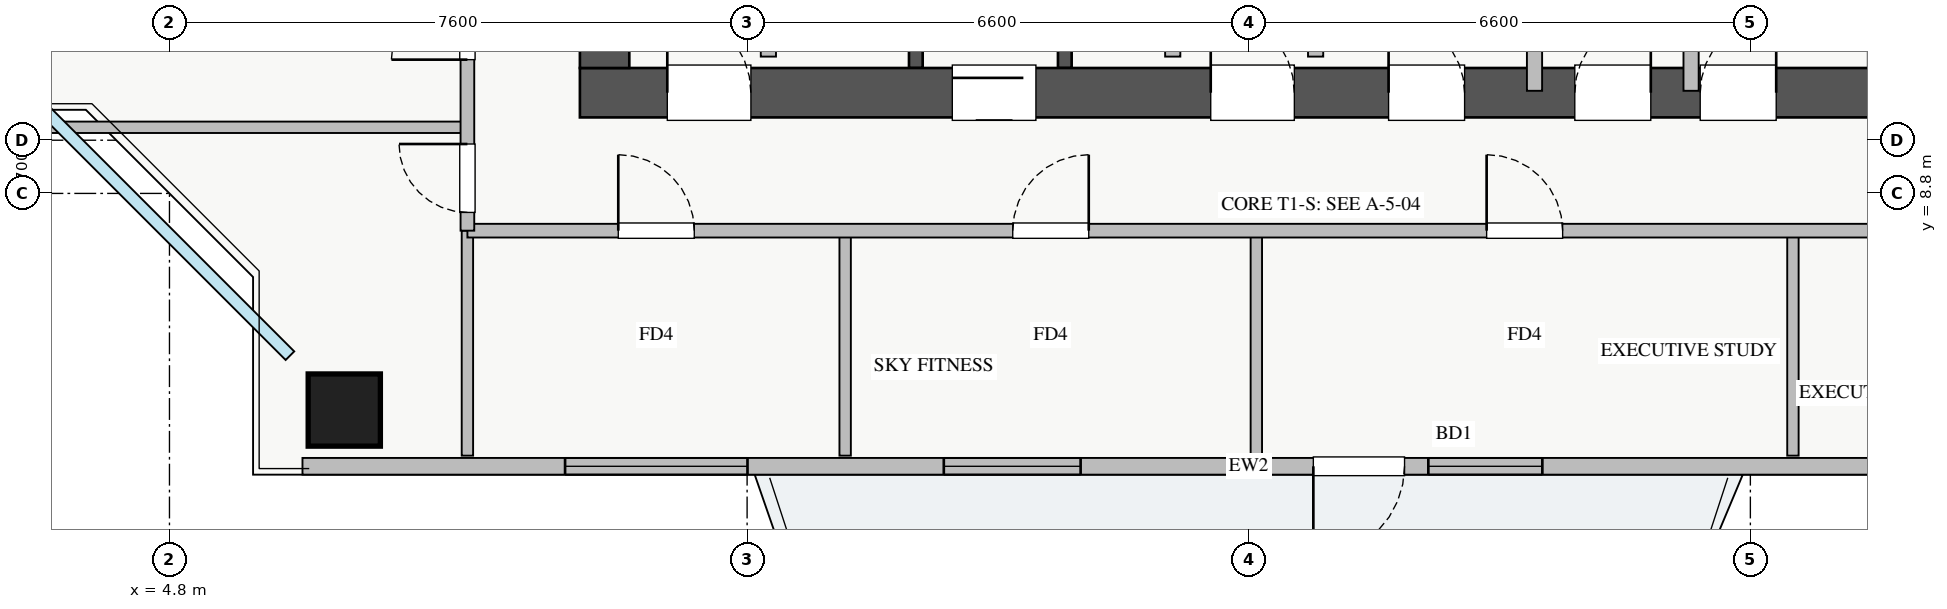
"""IFC4 building model, lengths in metres.
Left out: names, types, materials, properties, quantities, classifications, styles, units other than length and angle.
Written with IfcOpenShell. Run it as: python <this file> out.ifc"""

import sys

from ifc_helpers import new_model, si_unit, direction, frame, frame_2d, origin, origin_2d, place, context, subcontext, project, spatial, rectangle, extrude, source, transform, mapped, element, fill, save


model = new_model("IFC4")
c1 = context("Model", 3, precision=1e-05, world=origin(), true_north=direction((0.0, 1.0)))
c2 = subcontext(c1, "Body", "Model", "MODEL_VIEW")
j1 = project(units=[si_unit("LENGTHUNIT", "METRE"), si_unit("PLANEANGLEUNIT", "RADIAN")], contexts=[c1])
p1 = place(None, origin())
s1 = spatial("IfcSite", under=j1, at=p1, CompositionType="ELEMENT")
p2 = place(p1, origin())
s2 = spatial("IfcBuilding", under=s1, at=p2, CompositionType="ELEMENT")
p3 = place(p2, frame((0.0, 0.0, 179.5)))
s3 = spatial("IfcBuildingStorey", under=s2, at=p3, CompositionType="ELEMENT", Elevation=179.5)
for number, where, z_axis, x_axis in (
    (1, (14.62, 10.45, 0.0), (0.0, 0.0, 1.0), (0.0, 1.0, 0.0)),
    (2, (16.58, 10.45, 0.0), (0.0, 0.0, 1.0), (0.0, 1.0, 0.0)),
):
    element("IfcWall", number, at=place(p3, frame(where, z_axis=z_axis, x_axis=x_axis)), inside=s3, PredefinedType="SHEAR", context=c2, shape_type="SweptSolid", body=[
        extrude(rectangle(XDim=2.35, YDim=0.18, at=frame_2d((1.175, 0.0))), origin(), (0.0, 0.0, 1.0), 3.07),
    ])
p4 = place(p3, frame((10.2, 10.125, 0.0), z_axis=(0.0, 0.0, 1.0), x_axis=(1.0, 0.0, 0.0)))
e3 = element("IfcWall", 3, at=p4, inside=s3, PredefinedType="SHEAR", context=c2, shape_type="SweptSolid", body=[
    extrude(rectangle(XDim=17.6, YDim=0.65, at=frame_2d((8.8, 0.0))), origin(), (0.0, 0.0, 1.0), 3.25),
])
p5 = place(p4, frame((1.15, 0.0, 0.0)))
e4 = element("IfcOpeningElement", 4, at=p5, cuts=e3, PredefinedType="OPENING", context=c2, shape_type="SweptSolid", body=[
    extrude(rectangle(XDim=1.1, YDim=2.05, at=frame_2d((0.55, 1.025))), frame((0.0, 0.335, 0.0), z_axis=(0.0, -1.0, 0.0), x_axis=(1.0, 0.0, 0.0)), (0.0, 0.0, 1.0), 0.67),
])
p6 = place(p4, frame((8.3, 0.0, 0.0)))
e5 = element("IfcOpeningElement", 5, at=p6, cuts=e3, PredefinedType="OPENING", context=c2, shape_type="SweptSolid", body=[
    extrude(rectangle(XDim=1.1, YDim=2.05, at=frame_2d((0.55, 1.025))), frame((0.0, 0.335, 0.0), z_axis=(0.0, -1.0, 0.0), x_axis=(1.0, 0.0, 0.0)), (0.0, 0.0, 1.0), 0.67),
])
p7 = place(p4, frame((4.9, 0.0, 0.0)))
e6 = element("IfcOpeningElement", 6, at=p7, cuts=e3, PredefinedType="OPENING", context=c2, shape_type="SweptSolid", body=[
    extrude(rectangle(XDim=1.1, YDim=2.05, at=frame_2d((0.55, 1.025))), frame((0.0, 0.335, 0.0), z_axis=(0.0, -1.0, 0.0), x_axis=(1.0, 0.0, 0.0)), (0.0, 0.0, 1.0), 0.67),
])
p8 = place(p4, frame((14.74, 0.0, 0.0)))
e7 = element("IfcOpeningElement", 7, at=p8, cuts=e3, PredefinedType="OPENING", context=c2, shape_type="SweptSolid", body=[
    extrude(rectangle(XDim=1.0, YDim=2.05, at=frame_2d((0.5, 1.025))), frame((0.0, 0.335, 0.0), z_axis=(0.0, -1.0, 0.0), x_axis=(1.0, 0.0, 0.0)), (0.0, 0.0, 1.0), 0.67),
])
p9 = place(p4, frame((10.64, 0.0, 0.0)))
e8 = element("IfcOpeningElement", 8, at=p9, cuts=e3, PredefinedType="OPENING", context=c2, shape_type="SweptSolid", body=[
    extrude(rectangle(XDim=1.0, YDim=2.05, at=frame_2d((0.5, 1.025))), frame((0.0, 0.335, 0.0), z_axis=(0.0, -1.0, 0.0), x_axis=(1.0, 0.0, 0.0)), (0.0, 0.0, 1.0), 0.67),
])
p10 = place(p4, frame((13.09, 0.0, 0.0)))
e9 = element("IfcOpeningElement", 9, at=p10, cuts=e3, PredefinedType="OPENING", context=c2, shape_type="SweptSolid", body=[
    extrude(rectangle(XDim=1.0, YDim=2.05, at=frame_2d((0.5, 1.025))), frame((0.0, 0.335, 0.0), z_axis=(0.0, -1.0, 0.0), x_axis=(1.0, 0.0, 0.0)), (0.0, 0.0, 1.0), 0.67),
])
p11 = place(p3, frame((10.525, 10.45, 0.0), z_axis=(0.0, 0.0, 1.0), x_axis=(0.0, 1.0, 0.0)))
e10 = element("IfcWall", 10, at=p11, inside=s3, PredefinedType="SHEAR", context=c2, shape_type="SweptSolid", body=[
    extrude(rectangle(XDim=5.9, YDim=0.65, at=frame_2d((2.95, 0.0))), origin(), (0.0, 0.0, 1.0), 3.25),
])
m1 = source(origin(), c2, "Body", "SweptSolid", [
    extrude(rectangle(XDim=0.95, YDim=0.95, at=origin_2d()), origin(), (0.0, 0.0, 1.0), 3.25),
])
p12 = place(p3, frame((7.1, 5.95, 0.0), z_axis=(0.0, 0.0, 1.0), x_axis=(1.0, 0.0, 0.0)))
e11 = element("IfcColumn", 11, at=p12, inside=s3, PredefinedType="COLUMN", context=c2, shape_type="MappedRepresentation", body=[
    mapped(m1, transform((0.0, 0.0, 0.0), x_axis=(1.0, 0.0, 0.0), y_axis=(0.0, 1.0, 0.0), z_axis=(0.0, 0.0, 1.0), scale=1.0)),
])
p13 = place(p3, frame((6.55, 5.21, 0.0), z_axis=(0.0, 0.0, 1.0), x_axis=(1.0, 0.0, 0.0)))
e12 = element("IfcWall", 12, at=p13, inside=s3, PredefinedType="STANDARD", context=c2, shape_type="SweptSolid", body=[
    extrude(rectangle(XDim=24.9, YDim=0.22, at=frame_2d((12.45, 0.0))), origin(), (0.0, 0.0, 1.0), 2.61),
])
p14 = place(p13, frame((13.3, 0.0, 0.0)))
e13 = element("IfcOpeningElement", 13, at=p14, cuts=e12, PredefinedType="OPENING", context=c2, shape_type="SweptSolid", body=[
    extrude(rectangle(XDim=1.2, YDim=2.1, at=frame_2d((0.6, 1.05))), frame((0.0, 0.12, 0.0), z_axis=(0.0, -1.0, 0.0), x_axis=(1.0, 0.0, 0.0)), (0.0, 0.0, 1.0), 0.24),
])
p15 = place(p13, frame((3.455, 0.0, 0.9)))
e14 = element("IfcOpeningElement", 14, at=p15, cuts=e12, PredefinedType="OPENING", context=c2, shape_type="SweptSolid", body=[
    extrude(rectangle(XDim=2.4, YDim=1.5, at=frame_2d((1.2, 0.75))), frame((0.0, 0.12, 0.0), z_axis=(0.0, -1.0, 0.0), x_axis=(1.0, 0.0, 0.0)), (0.0, 0.0, 1.0), 0.24),
])
p16 = place(p13, frame((8.438, 0.0, 0.9)))
e15 = element("IfcOpeningElement", 15, at=p16, cuts=e12, PredefinedType="OPENING", context=c2, shape_type="SweptSolid", body=[
    extrude(rectangle(XDim=1.8, YDim=1.45, at=frame_2d((0.9, 0.725))), frame((0.0, 0.12, 0.0), z_axis=(0.0, -1.0, 0.0), x_axis=(1.0, 0.0, 0.0)), (0.0, 0.0, 1.0), 0.24),
])
p17 = place(p13, frame((14.813, 0.0, 0.9)))
e16 = element("IfcOpeningElement", 16, at=p17, cuts=e12, PredefinedType="OPENING", context=c2, shape_type="SweptSolid", body=[
    extrude(rectangle(XDim=1.5, YDim=1.45, at=frame_2d((0.75, 0.725))), frame((0.0, 0.12, 0.0), z_axis=(0.0, -1.0, 0.0), x_axis=(1.0, 0.0, 0.0)), (0.0, 0.0, 1.0), 0.24),
])
p18 = place(p13, frame((20.738, 0.0, 0.9)))
e17 = element("IfcOpeningElement", 17, at=p18, cuts=e12, PredefinedType="OPENING", context=c2, shape_type="SweptSolid", body=[
    extrude(rectangle(XDim=2.1, YDim=1.48, at=frame_2d((1.05, 0.74))), frame((0.0, 0.12, 0.0), z_axis=(0.0, -1.0, 0.0), x_axis=(1.0, 0.0, 0.0)), (0.0, 0.0, 1.0), 0.24),
])
for number, where, z_axis, x_axis in (
    (18, (12.68, 10.6, 0.0), (0.0, 0.0, 1.0), (0.0, 1.0, 0.0)),
    (19, (18.0, 10.6, 0.0), (0.0, 0.0, 1.0), (0.0, 1.0, 0.0)),
    (20, (19.88, 10.6, 0.0), (0.0, 0.0, 1.0), (0.0, 1.0, 0.0)),
):
    element("IfcWall", number, at=place(p3, frame(where, z_axis=z_axis, x_axis=x_axis)), inside=s3, PredefinedType="PARTITIONING", context=c2, shape_type="SweptSolid", body=[
        extrude(rectangle(XDim=2.21, YDim=0.2, at=frame_2d((1.105, 0.0))), origin(), (0.0, 0.0, 1.0), 3.07),
    ])
for number, where, z_axis, x_axis in (
    (21, (24.82, 10.15, 0.0), (0.0, 0.0, 1.0), (0.0, 1.0, 0.0)),
    (22, (22.76, 10.15, 0.0), (0.0, 0.0, 1.0), (0.0, 1.0, 0.0)),
):
    element("IfcWall", number, at=place(p3, frame(where, z_axis=z_axis, x_axis=x_axis)), inside=s3, PredefinedType="PARTITIONING", context=c2, shape_type="SweptSolid", body=[
        extrude(rectangle(XDim=2.65, YDim=0.2, at=frame_2d((1.325, 0.0))), origin(), (0.0, 0.0, 1.0), 3.07),
    ])
p19 = place(p3, frame((13.69, 5.35, 0.0), z_axis=(0.0, 0.0, 1.0), x_axis=(0.0, 1.0, 0.0)))
e23 = element("IfcWall", 23, at=p19, inside=s3, PredefinedType="PARTITIONING", context=c2, shape_type="SweptSolid", body=[
    extrude(rectangle(XDim=2.96, YDim=0.15, at=frame_2d((1.48, 0.0))), origin(), (0.0, 0.0, 1.0), 3.07),
])
p20 = place(p3, frame((19.1, 5.35, 0.0), z_axis=(0.0, 0.0, 1.0), x_axis=(0.0, 1.0, 0.0)))
e24 = element("IfcWall", 24, at=p20, inside=s3, PredefinedType="PARTITIONING", context=c2, shape_type="SweptSolid", body=[
    extrude(rectangle(XDim=2.96, YDim=0.15, at=frame_2d((1.48, 0.0))), origin(), (0.0, 0.0, 1.0), 2.821),
])
for number, where, z_axis, x_axis in (
    (25, (26.16, 5.35, 0.0), (0.0, 0.0, 1.0), (0.0, 1.0, 0.0)),
    (26, (8.72, 5.35, 0.0), (0.0, 0.0, 1.0), (0.0, 1.0, 0.0)),
):
    element("IfcWall", number, at=place(p3, frame(where, z_axis=z_axis, x_axis=x_axis)), inside=s3, PredefinedType="PARTITIONING", context=c2, shape_type="SweptSolid", body=[
        extrude(rectangle(XDim=2.96, YDim=0.15, at=frame_2d((1.48, 0.0))), origin(), (0.0, 0.0, 1.0), 3.07),
    ])
p21 = place(p3, frame((8.72, 8.31, 0.0), z_axis=(0.0, 0.0, 1.0), x_axis=(1.0, 0.0, 0.0)))
e27 = element("IfcWall", 27, at=p21, inside=s3, PredefinedType="PARTITIONING", context=c2, shape_type="SweptSolid", body=[
    extrude(rectangle(XDim=23.63, YDim=0.18, at=frame_2d((11.815, 0.0))), origin(), (0.0, 0.0, 1.0), 3.07),
])
p22 = place(p21, frame((1.985, 0.0, 0.0)))
e28 = element("IfcOpeningElement", 28, at=p22, cuts=e27, PredefinedType="OPENING", context=c2, shape_type="SweptSolid", body=[
    extrude(rectangle(XDim=1.0, YDim=2.05, at=frame_2d((0.5, 1.025))), frame((0.0, 0.1, 0.0), z_axis=(0.0, -1.0, 0.0), x_axis=(1.0, 0.0, 0.0)), (0.0, 0.0, 1.0), 0.2),
])
p23 = place(p21, frame((7.175, 0.0, 0.0)))
e29 = element("IfcOpeningElement", 29, at=p23, cuts=e27, PredefinedType="OPENING", context=c2, shape_type="SweptSolid", body=[
    extrude(rectangle(XDim=1.0, YDim=2.05, at=frame_2d((0.5, 1.025))), frame((0.0, 0.1, 0.0), z_axis=(0.0, -1.0, 0.0), x_axis=(1.0, 0.0, 0.0)), (0.0, 0.0, 1.0), 0.2),
])
p24 = place(p21, frame((13.41, 0.0, 0.0)))
e30 = element("IfcOpeningElement", 30, at=p24, cuts=e27, PredefinedType="OPENING", context=c2, shape_type="SweptSolid", body=[
    extrude(rectangle(XDim=1.0, YDim=2.05, at=frame_2d((0.5, 1.025))), frame((0.0, 0.1, 0.0), z_axis=(0.0, -1.0, 0.0), x_axis=(1.0, 0.0, 0.0)), (0.0, 0.0, 1.0), 0.2),
])
p25 = place(p21, frame((19.85, 0.0, 0.0)))
e31 = element("IfcOpeningElement", 31, at=p25, cuts=e27, PredefinedType="OPENING", context=c2, shape_type="SweptSolid", body=[
    extrude(rectangle(XDim=1.0, YDim=2.05, at=frame_2d((0.5, 1.025))), frame((0.0, 0.1, 0.0), z_axis=(0.0, -1.0, 0.0), x_axis=(1.0, 0.0, 0.0)), (0.0, 0.0, 1.0), 0.2),
])
p26 = place(p3, frame((1.35, 9.67, 0.0), z_axis=(0.0, 0.0, 1.0), x_axis=(1.0, 0.0, 0.0)))
e32 = element("IfcWall", 32, at=p26, inside=s3, PredefinedType="PARTITIONING", context=c2, shape_type="SweptSolid", body=[
    extrude(rectangle(XDim=7.37, YDim=0.15, at=frame_2d((3.685, 0.0))), origin(), (0.0, 0.0, 1.0), 3.07),
])
p27 = place(p3, frame((8.72, 8.31, 0.0), z_axis=(0.0, 0.0, 1.0), x_axis=(0.0, 1.0, 0.0)))
e33 = element("IfcWall", 33, at=p27, inside=s3, PredefinedType="PARTITIONING", context=c2, shape_type="SweptSolid", body=[
    extrude(rectangle(XDim=29.37, YDim=0.18, at=frame_2d((14.685, 0.0))), origin(), (0.0, 0.0, 1.0), 3.07),
])
p28 = place(p27, frame((28.06, 0.0, 0.0)))
e34 = element("IfcOpeningElement", 34, at=p28, cuts=e33, PredefinedType="OPENING", context=c2, shape_type="SweptSolid", body=[
    extrude(rectangle(XDim=0.9, YDim=2.05, at=frame_2d((0.45, 1.025))), frame((0.0, 0.1, 0.0), z_axis=(0.0, -1.0, 0.0), x_axis=(1.0, 0.0, 0.0)), (0.0, 0.0, 1.0), 0.2),
])
p29 = place(p27, frame((0.24, 0.0, 0.0)))
e35 = element("IfcOpeningElement", 35, at=p29, cuts=e33, PredefinedType="OPENING", context=c2, shape_type="SweptSolid", body=[
    extrude(rectangle(XDim=0.9, YDim=2.05, at=frame_2d((0.45, 1.025))), frame((0.0, 0.1, 0.0), z_axis=(0.0, -1.0, 0.0), x_axis=(1.0, 0.0, 0.0)), (0.0, 0.0, 1.0), 0.2),
])
p30 = place(p27, frame((2.25, 0.0, 0.0)))
e36 = element("IfcOpeningElement", 36, at=p30, cuts=e33, PredefinedType="OPENING", context=c2, shape_type="SweptSolid", body=[
    extrude(rectangle(XDim=1.0, YDim=2.05, at=frame_2d((0.5, 1.025))), frame((0.0, 0.1, 0.0), z_axis=(0.0, -1.0, 0.0), x_axis=(1.0, 0.0, 0.0)), (0.0, 0.0, 1.0), 0.2),
])
p31 = place(p27, frame((7.935, 0.0, 0.0)))
e37 = element("IfcOpeningElement", 37, at=p31, cuts=e33, PredefinedType="OPENING", context=c2, shape_type="SweptSolid", body=[
    extrude(rectangle(XDim=1.0, YDim=2.05, at=frame_2d((0.5, 1.025))), frame((0.0, 0.1, 0.0), z_axis=(0.0, -1.0, 0.0), x_axis=(1.0, 0.0, 0.0)), (0.0, 0.0, 1.0), 0.2),
])
p32 = place(p27, frame((17.3, 0.0, 0.0)))
e38 = element("IfcOpeningElement", 38, at=p32, cuts=e33, PredefinedType="OPENING", context=c2, shape_type="SweptSolid", body=[
    extrude(rectangle(XDim=1.0, YDim=2.05, at=frame_2d((0.5, 1.025))), frame((0.0, 0.1, 0.0), z_axis=(0.0, -1.0, 0.0), x_axis=(1.0, 0.0, 0.0)), (0.0, 0.0, 1.0), 0.2),
])
p33 = place(p27, frame((21.98, 0.0, 0.0)))
e39 = element("IfcOpeningElement", 39, at=p33, cuts=e33, PredefinedType="OPENING", context=c2, shape_type="SweptSolid", body=[
    extrude(rectangle(XDim=1.0, YDim=2.05, at=frame_2d((0.5, 1.025))), frame((0.0, 0.1, 0.0), z_axis=(0.0, -1.0, 0.0), x_axis=(1.0, 0.0, 0.0)), (0.0, 0.0, 1.0), 0.2),
])
m2 = source(origin(), c2, "Body", "SweptSolid", [
    extrude(rectangle(XDim=1.2, YDim=2.1, at=frame_2d((0.6, 1.05))), frame((0.0, 0.025, 0.0), z_axis=(0.0, -1.0, 0.0), x_axis=(1.0, 0.0, 0.0)), (0.0, 0.0, 1.0), 0.05),
])
p34 = place(p14, frame((1.2, 0.0, 0.0), z_axis=(0.0, 0.0, 1.0), x_axis=(-1.0, 0.0, 0.0)))
e40 = element("IfcDoor", 40, at=p34, inside=s3, OperationType="SINGLE_SWING_LEFT", PredefinedType="DOOR", context=c2, shape_type="MappedRepresentation", body=[
    mapped(m2, transform((0.0, 0.0, 0.0), x_axis=(1.0, 0.0, 0.0), y_axis=(0.0, 1.0, 0.0), z_axis=(0.0, 0.0, 1.0), scale=1.0)),
])
fill(e13, e40)
m3 = source(origin(), c2, "Body", "SweptSolid", [
    extrude(rectangle(XDim=2.4, YDim=1.5, at=frame_2d((1.2, 0.75))), frame((0.0, 0.03, 0.0), z_axis=(0.0, -1.0, 0.0), x_axis=(1.0, 0.0, 0.0)), (0.0, 0.0, 1.0), 0.06),
])
p35 = place(p15, origin())
e41 = element("IfcWindow", 41, at=p35, inside=s3, PartitioningType="TRIPLE_PANEL_VERTICAL", PredefinedType="WINDOW", context=c2, shape_type="MappedRepresentation", body=[
    mapped(m3, transform((0.0, 0.0, 0.0), x_axis=(1.0, 0.0, 0.0), y_axis=(0.0, 1.0, 0.0), z_axis=(0.0, 0.0, 1.0), scale=1.0)),
])
fill(e14, e41)
m4 = source(origin(), c2, "Body", "SweptSolid", [
    extrude(rectangle(XDim=1.8, YDim=1.45, at=frame_2d((0.9, 0.725))), frame((0.0, 0.03, 0.0), z_axis=(0.0, -1.0, 0.0), x_axis=(1.0, 0.0, 0.0)), (0.0, 0.0, 1.0), 0.06),
])
p36 = place(p16, origin())
e42 = element("IfcWindow", 42, at=p36, inside=s3, PartitioningType="DOUBLE_PANEL_VERTICAL", PredefinedType="WINDOW", context=c2, shape_type="MappedRepresentation", body=[
    mapped(m4, transform((0.0, 0.0, 0.0), x_axis=(1.0, 0.0, 0.0), y_axis=(0.0, 1.0, 0.0), z_axis=(0.0, 0.0, 1.0), scale=1.0)),
])
fill(e15, e42)
m5 = source(origin(), c2, "Body", "SweptSolid", [
    extrude(rectangle(XDim=1.5, YDim=1.45, at=frame_2d((0.75, 0.725))), frame((0.0, 0.03, 0.0), z_axis=(0.0, -1.0, 0.0), x_axis=(1.0, 0.0, 0.0)), (0.0, 0.0, 1.0), 0.06),
])
p37 = place(p17, origin())
e43 = element("IfcWindow", 43, at=p37, inside=s3, PartitioningType="DOUBLE_PANEL_VERTICAL", PredefinedType="WINDOW", context=c2, shape_type="MappedRepresentation", body=[
    mapped(m5, transform((0.0, 0.0, 0.0), x_axis=(1.0, 0.0, 0.0), y_axis=(0.0, 1.0, 0.0), z_axis=(0.0, 0.0, 1.0), scale=1.0)),
])
fill(e16, e43)
m6 = source(origin(), c2, "Body", "SweptSolid", [
    extrude(rectangle(XDim=1.1, YDim=2.05, at=frame_2d((0.55, 1.025))), frame((0.0, 0.025, 0.0), z_axis=(0.0, -1.0, 0.0), x_axis=(1.0, 0.0, 0.0)), (0.0, 0.0, 1.0), 0.05),
])
p38 = place(p5, origin())
e44 = element("IfcDoor", 44, at=p38, inside=s3, OperationType="SINGLE_SWING_LEFT", PredefinedType="DOOR", context=c2, shape_type="MappedRepresentation", body=[
    mapped(m6, transform((0.0, 0.0, 0.0), x_axis=(1.0, 0.0, 0.0), y_axis=(0.0, 1.0, 0.0), z_axis=(0.0, 0.0, 1.0), scale=1.0)),
])
fill(e4, e44)
p39 = place(p6, origin())
e45 = element("IfcDoor", 45, at=p39, inside=s3, OperationType="SINGLE_SWING_LEFT", PredefinedType="DOOR", context=c2, shape_type="MappedRepresentation", body=[
    mapped(m6, transform((0.0, 0.0, 0.0), x_axis=(1.0, 0.0, 0.0), y_axis=(0.0, 1.0, 0.0), z_axis=(0.0, 0.0, 1.0), scale=1.0)),
])
fill(e5, e45)
p40 = place(p7, origin())
e46 = element("IfcDoor", 46, at=p40, inside=s3, OperationType="SLIDING_TO_RIGHT", PredefinedType="DOOR", context=c2, shape_type="MappedRepresentation", body=[
    mapped(m6, transform((0.0, 0.0, 0.0), x_axis=(1.0, 0.0, 0.0), y_axis=(0.0, 1.0, 0.0), z_axis=(0.0, 0.0, 1.0), scale=1.0)),
])
fill(e6, e46)
m7 = source(origin(), c2, "Body", "SweptSolid", [
    extrude(rectangle(XDim=1.0, YDim=2.05, at=frame_2d((0.5, 1.025))), frame((0.0, 0.025, 0.0), z_axis=(0.0, -1.0, 0.0), x_axis=(1.0, 0.0, 0.0)), (0.0, 0.0, 1.0), 0.05),
])
p41 = place(p8, origin())
e47 = element("IfcDoor", 47, at=p41, inside=s3, OperationType="SINGLE_SWING_RIGHT", PredefinedType="DOOR", context=c2, shape_type="MappedRepresentation", body=[
    mapped(m7, transform((0.0, 0.0, 0.0), x_axis=(1.0, 0.0, 0.0), y_axis=(0.0, 1.0, 0.0), z_axis=(0.0, 0.0, 1.0), scale=1.0)),
])
fill(e7, e47)
p42 = place(p9, origin())
e48 = element("IfcDoor", 48, at=p42, inside=s3, OperationType="SINGLE_SWING_LEFT", PredefinedType="DOOR", context=c2, shape_type="MappedRepresentation", body=[
    mapped(m7, transform((0.0, 0.0, 0.0), x_axis=(1.0, 0.0, 0.0), y_axis=(0.0, 1.0, 0.0), z_axis=(0.0, 0.0, 1.0), scale=1.0)),
])
fill(e8, e48)
p43 = place(p10, origin())
e49 = element("IfcDoor", 49, at=p43, inside=s3, OperationType="SINGLE_SWING_RIGHT", PredefinedType="DOOR", context=c2, shape_type="MappedRepresentation", body=[
    mapped(m7, transform((0.0, 0.0, 0.0), x_axis=(1.0, 0.0, 0.0), y_axis=(0.0, 1.0, 0.0), z_axis=(0.0, 0.0, 1.0), scale=1.0)),
])
fill(e9, e49)
p44 = place(p22, origin())
e50 = element("IfcDoor", 50, at=p44, inside=s3, OperationType="SINGLE_SWING_LEFT", PredefinedType="DOOR", context=c2, shape_type="MappedRepresentation", body=[
    mapped(m7, transform((0.0, 0.0, 0.0), x_axis=(1.0, 0.0, 0.0), y_axis=(0.0, 1.0, 0.0), z_axis=(0.0, 0.0, 1.0), scale=1.0)),
])
fill(e28, e50)
p45 = place(p23, origin())
e51 = element("IfcDoor", 51, at=p45, inside=s3, OperationType="SINGLE_SWING_RIGHT", PredefinedType="DOOR", context=c2, shape_type="MappedRepresentation", body=[
    mapped(m7, transform((0.0, 0.0, 0.0), x_axis=(1.0, 0.0, 0.0), y_axis=(0.0, 1.0, 0.0), z_axis=(0.0, 0.0, 1.0), scale=1.0)),
])
fill(e29, e51)
p46 = place(p24, origin())
e52 = element("IfcDoor", 52, at=p46, inside=s3, OperationType="SINGLE_SWING_LEFT", PredefinedType="DOOR", context=c2, shape_type="MappedRepresentation", body=[
    mapped(m7, transform((0.0, 0.0, 0.0), x_axis=(1.0, 0.0, 0.0), y_axis=(0.0, 1.0, 0.0), z_axis=(0.0, 0.0, 1.0), scale=1.0)),
])
fill(e30, e52)
m8 = source(origin(), c2, "Body", "SweptSolid", [
    extrude(rectangle(XDim=0.9, YDim=2.05, at=frame_2d((0.45, 1.025))), frame((0.0, 0.025, 0.0), z_axis=(0.0, -1.0, 0.0), x_axis=(1.0, 0.0, 0.0)), (0.0, 0.0, 1.0), 0.05),
])
p47 = place(p29, origin())
e53 = element("IfcDoor", 53, at=p47, inside=s3, OperationType="SINGLE_SWING_RIGHT", PredefinedType="DOOR", context=c2, shape_type="MappedRepresentation", body=[
    mapped(m8, transform((0.0, 0.0, 0.0), x_axis=(1.0, 0.0, 0.0), y_axis=(0.0, 1.0, 0.0), z_axis=(0.0, 0.0, 1.0), scale=1.0)),
])
fill(e35, e53)
p48 = place(p30, origin())
e54 = element("IfcDoor", 54, at=p48, inside=s3, OperationType="SINGLE_SWING_LEFT", PredefinedType="DOOR", context=c2, shape_type="MappedRepresentation", body=[
    mapped(m7, transform((0.0, 0.0, 0.0), x_axis=(1.0, 0.0, 0.0), y_axis=(0.0, 1.0, 0.0), z_axis=(0.0, 0.0, 1.0), scale=1.0)),
])
fill(e36, e54)
save(model, sys.argv[1])
